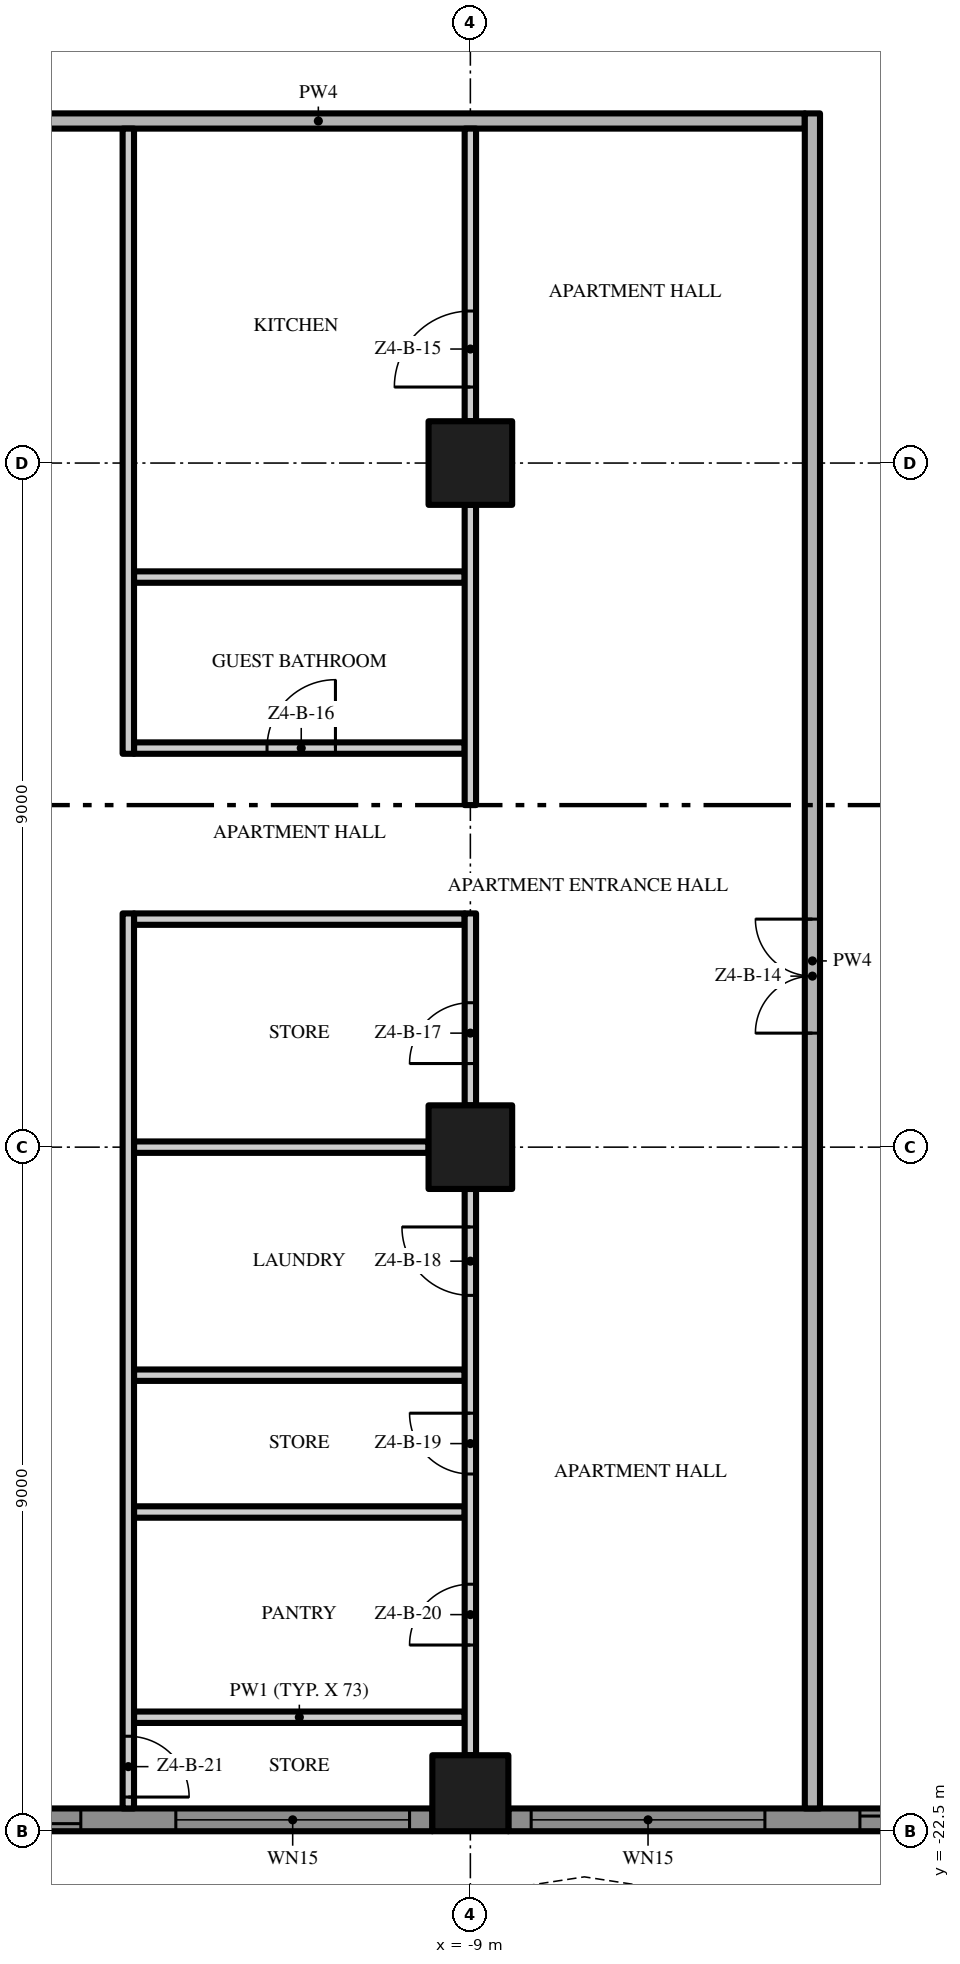
"""IFC4 building model, lengths in metres.
Left out: names, types, materials, properties, quantities, classifications, styles, units other than length and angle.
Written with IfcOpenShell. Run it as: python <this file> out.ifc"""

import sys

from ifc_helpers import new_model, si_unit, direction, frame, frame_2d, origin, origin_2d, place, context, subcontext, project, spatial, polyline, rectangle, outline, extrude, element, fill, save


model = new_model("IFC4")
c1 = context("Model", 3, precision=1e-05, world=origin(), true_north=direction((0.0, 1.0)))
c2 = subcontext(c1, "Body", "Model", "MODEL_VIEW")
j1 = project(units=[si_unit("LENGTHUNIT", "METRE"), si_unit("PLANEANGLEUNIT", "RADIAN")], contexts=[c1])
p1 = place(None, origin())
s1 = spatial("IfcSite", under=j1, at=p1, CompositionType="ELEMENT")
p2 = place(p1, origin())
s2 = spatial("IfcBuilding", under=s1, at=p2, CompositionType="ELEMENT")
p3 = place(p2, frame((0.0, 0.0, 203.4)))
s3 = spatial("IfcBuildingStorey", under=s2, at=p3, CompositionType="ELEMENT", Elevation=203.4)
p4 = place(p3, frame((-9.0, -13.5, 0.0), z_axis=(0.0, 0.0, 1.0), x_axis=(1.0, 0.0, 0.0)))
e1 = element("IfcColumn", 1, at=p4, inside=s3, PredefinedType="COLUMN", context=c2, shape_type="SweptSolid", body=[
    extrude(rectangle(XDim=1.1, YDim=1.1, at=origin_2d()), origin(), (0.0, 0.0, 1.0), 3.5),
])
p5 = place(p3, frame((-9.0, -22.0, 0.0), z_axis=(0.0, 0.0, 1.0), x_axis=(1.0, 0.0, 0.0)))
e2 = element("IfcColumn", 2, at=p5, inside=s3, PredefinedType="COLUMN", context=c2, shape_type="SweptSolid", body=[
    extrude(rectangle(XDim=1.0, YDim=1.0, at=origin_2d()), origin(), (0.0, 0.0, 1.0), 3.5),
])
p6 = place(p3, frame((-9.0, -4.5, 0.0), z_axis=(0.0, 0.0, 1.0), x_axis=(1.0, 0.0, 0.0)))
e3 = element("IfcColumn", 3, at=p6, inside=s3, PredefinedType="COLUMN", context=c2, shape_type="SweptSolid", body=[
    extrude(rectangle(XDim=1.1, YDim=1.1, at=origin_2d()), origin(), (0.0, 0.0, 1.0), 3.5),
])
p7 = place(p3, frame((-9.5, -22.35, 0.0), z_axis=(0.0, 0.0, 1.0), x_axis=(-1.0, 0.0, 0.0)))
e4 = element("IfcWall", 4, at=p7, inside=s3, PredefinedType="SOLIDWALL", context=c2, shape_type="SweptSolid", body=[
    extrude(rectangle(XDim=8.0, YDim=0.3, at=frame_2d((4.0, 0.0))), origin(), (0.0, 0.0, 1.0), 3.5),
])
p8 = place(p7, frame((4.625, 0.0, 0.0)))
e5 = element("IfcOpeningElement", 5, at=p8, cuts=e4, PredefinedType="OPENING", context=c2, shape_type="SweptSolid", body=[
    extrude(rectangle(XDim=3.075, YDim=2.4, at=frame_2d((1.538, 1.2))), frame((0.0, 0.16, 0.0), z_axis=(0.0, -1.0, 0.0), x_axis=(1.0, 0.0, 0.0)), (0.0, 0.0, 1.0), 0.32),
])
p9 = place(p7, frame((0.3, 0.0, 0.45)))
e6 = element("IfcOpeningElement", 6, at=p9, cuts=e4, PredefinedType="OPENING", context=c2, shape_type="SweptSolid", body=[
    extrude(rectangle(XDim=3.075, YDim=2.65, at=frame_2d((1.538, 1.325))), frame((0.0, 0.16, 0.0), z_axis=(0.0, -1.0, 0.0), x_axis=(1.0, 0.0, 0.0)), (0.0, 0.0, 1.0), 0.32),
])
p10 = place(p3, frame((-0.5, -22.35, 0.0), z_axis=(0.0, 0.0, 1.0), x_axis=(-1.0, 0.0, 0.0)))
e7 = element("IfcWall", 7, at=p10, inside=s3, PredefinedType="SOLIDWALL", context=c2, shape_type="SweptSolid", body=[
    extrude(rectangle(XDim=8.0, YDim=0.3, at=frame_2d((4.0, 0.0))), origin(), (0.0, 0.0, 1.0), 3.5),
])
p11 = place(p10, frame((4.625, 0.0, 0.45)))
e8 = element("IfcOpeningElement", 8, at=p11, cuts=e7, PredefinedType="OPENING", context=c2, shape_type="SweptSolid", body=[
    extrude(rectangle(XDim=3.075, YDim=2.65, at=frame_2d((1.538, 1.325))), frame((0.0, 0.16, 0.0), z_axis=(0.0, -1.0, 0.0), x_axis=(1.0, 0.0, 0.0)), (0.0, 0.0, 1.0), 0.32),
])
p12 = place(p10, frame((0.3, 0.0, 0.0)))
e9 = element("IfcOpeningElement", 9, at=p12, cuts=e7, PredefinedType="OPENING", context=c2, shape_type="SweptSolid", body=[
    extrude(rectangle(XDim=3.075, YDim=2.4, at=frame_2d((1.538, 1.2))), frame((0.0, 0.16, 0.0), z_axis=(0.0, -1.0, 0.0), x_axis=(1.0, 0.0, 0.0)), (0.0, 0.0, 1.0), 0.32),
])
p13 = place(p3, origin())
e10 = element("IfcWall", 10, at=p13, inside=s3, PredefinedType="USERDEFINED", context=c2, shape_type="SweptSolid", body=[
    extrude(outline(polyline([(-22.5, -23.1), (-21.0, -23.329), (-19.5, -23.929), (-18.0, -24.671), (-16.5, -25.271), (-15.0, -25.5), (-13.5, -25.271), (-12.0, -24.671), (-10.5, -23.929), (-9.0, -23.329), (-7.5, -23.1), (-6.0, -23.329), (-4.5, -23.929), (-3.0, -24.671), (-1.5, -25.271), (0.0, -25.5), (1.5, -25.271), (3.0, -24.671), (4.5, -23.929), (6.0, -23.329), (7.5, -23.1), (9.0, -23.329), (10.5, -23.929), (12.0, -24.671), (13.5, -25.271), (15.0, -25.5), (16.5, -25.271), (18.0, -24.671), (19.5, -23.929), (21.0, -23.329), (22.5, -23.1), (22.462, -22.853), (20.934, -23.086), (19.398, -23.701), (17.898, -24.442), (16.434, -25.028), (15.0, -25.247), (13.566, -25.028), (12.102, -24.442), (10.602, -23.701), (9.066, -23.086), (7.5, -22.847), (5.934, -23.086), (4.398, -23.701), (2.898, -24.442), (1.434, -25.028), (0.0, -25.247), (-1.434, -25.028), (-2.898, -24.442), (-4.398, -23.701), (-5.934, -23.086), (-7.5, -22.847), (-9.066, -23.086), (-10.602, -23.701), (-12.102, -24.442), (-13.566, -25.028), (-15.0, -25.247), (-16.434, -25.028), (-17.898, -24.442), (-19.398, -23.701), (-20.934, -23.086), (-22.462, -22.853), (-22.5, -23.1)])), origin(), (0.0, 0.0, 1.0), 0.9),
])
for number, where, z_axis, x_axis in (
    (11, (-13.425, -21.0, 0.0), (0.0, 0.0, 1.0), (1.0, 0.0, 0.0)),
    (12, (-13.425, -18.3, 0.0), (0.0, 0.0, 1.0), (1.0, 0.0, 0.0)),
    (13, (-13.425, -16.5, 0.0), (0.0, 0.0, 1.0), (1.0, 0.0, 0.0)),
):
    element("IfcWall", number, at=place(p3, frame(where, z_axis=z_axis, x_axis=x_axis)), inside=s3, PredefinedType="PARTITIONING", context=c2, shape_type="SweptSolid", body=[
        extrude(rectangle(XDim=4.35, YDim=0.15, at=frame_2d((2.175, 0.0))), origin(), (0.0, 0.0, 1.0), 3.5),
    ])
p14 = place(p3, frame((-13.425, -13.5, 0.0), z_axis=(0.0, 0.0, 1.0), x_axis=(1.0, 0.0, 0.0)))
e14 = element("IfcWall", 14, at=p14, inside=s3, PredefinedType="PARTITIONING", context=c2, shape_type="SweptSolid", body=[
    extrude(rectangle(XDim=3.875, YDim=0.15, at=frame_2d((1.938, 0.0))), origin(), (0.0, 0.0, 1.0), 3.5),
])
p15 = place(p3, frame((-13.425, -10.5, 0.0), z_axis=(0.0, 0.0, 1.0), x_axis=(1.0, 0.0, 0.0)))
e15 = element("IfcWall", 15, at=p15, inside=s3, PredefinedType="PARTITIONING", context=c2, shape_type="SweptSolid", body=[
    extrude(rectangle(XDim=4.35, YDim=0.15, at=frame_2d((2.175, 0.0))), origin(), (0.0, 0.0, 1.0), 3.5),
])
p16 = place(p3, frame((-13.425, -8.25, 0.0), z_axis=(0.0, 0.0, 1.0), x_axis=(1.0, 0.0, 0.0)))
e16 = element("IfcWall", 16, at=p16, inside=s3, PredefinedType="PARTITIONING", context=c2, shape_type="SweptSolid", body=[
    extrude(rectangle(XDim=4.35, YDim=0.15, at=frame_2d((2.175, 0.0))), origin(), (0.0, 0.0, 1.0), 3.5),
])
p17 = place(p16, frame((1.75, 0.0, 0.0)))
e17 = element("IfcOpeningElement", 17, at=p17, cuts=e16, PredefinedType="OPENING", context=c2, shape_type="SweptSolid", body=[
    extrude(rectangle(XDim=0.9, YDim=2.1, at=frame_2d((0.45, 1.05))), frame((0.0, 0.085, 0.0), z_axis=(0.0, -1.0, 0.0), x_axis=(1.0, 0.0, 0.0)), (0.0, 0.0, 1.0), 0.17),
])
p18 = place(p3, frame((-13.425, -6.0, 0.0), z_axis=(0.0, 0.0, 1.0), x_axis=(1.0, 0.0, 0.0)))
e18 = element("IfcWall", 18, at=p18, inside=s3, PredefinedType="PARTITIONING", context=c2, shape_type="SweptSolid", body=[
    extrude(rectangle(XDim=4.35, YDim=0.15, at=frame_2d((2.175, 0.0))), origin(), (0.0, 0.0, 1.0), 3.5),
])
p19 = place(p3, frame((-17.4, 0.0, 0.0), z_axis=(0.0, 0.0, 1.0), x_axis=(1.0, 0.0, 0.0)))
e19 = element("IfcWall", 19, at=p19, inside=s3, PredefinedType="PARTITIONING", context=c2, shape_type="SweptSolid", body=[
    extrude(rectangle(XDim=12.8, YDim=0.2, at=frame_2d((6.4, 0.0))), origin(), (0.0, 0.0, 1.0), 3.5),
])
p20 = place(p3, frame((-13.5, -10.425, 0.0), z_axis=(0.0, 0.0, 1.0), x_axis=(0.0, -1.0, 0.0)))
e20 = element("IfcWall", 20, at=p20, inside=s3, PredefinedType="PARTITIONING", context=c2, shape_type="SweptSolid", body=[
    extrude(rectangle(XDim=11.775, YDim=0.15, at=frame_2d((5.888, 0.0))), origin(), (0.0, 0.0, 1.0), 3.5),
])
p21 = place(p20, frame((10.825, 0.0, 0.0)))
e21 = element("IfcOpeningElement", 21, at=p21, cuts=e20, PredefinedType="OPENING", context=c2, shape_type="SweptSolid", body=[
    extrude(rectangle(XDim=0.8, YDim=2.0, at=frame_2d((0.4, 1.0))), frame((0.0, 0.085, 0.0), z_axis=(0.0, -1.0, 0.0), x_axis=(1.0, 0.0, 0.0)), (0.0, 0.0, 1.0), 0.17),
])
p22 = place(p3, frame((-13.5, -8.325, 0.0), z_axis=(0.0, 0.0, 1.0), x_axis=(0.0, 1.0, 0.0)))
e22 = element("IfcWall", 22, at=p22, inside=s3, PredefinedType="PARTITIONING", context=c2, shape_type="SweptSolid", body=[
    extrude(rectangle(XDim=8.225, YDim=0.15, at=frame_2d((4.112, 0.0))), origin(), (0.0, 0.0, 1.0), 3.5),
])
p23 = place(p3, frame((-9.0, -21.5, 0.0), z_axis=(0.0, 0.0, 1.0), x_axis=(0.0, 1.0, 0.0)))
e23 = element("IfcWall", 23, at=p23, inside=s3, PredefinedType="PARTITIONING", context=c2, shape_type="SweptSolid", body=[
    extrude(rectangle(XDim=7.45, YDim=0.15, at=frame_2d((3.725, 0.0))), origin(), (0.0, 0.0, 1.0), 3.5),
])
p24 = place(p23, frame((6.05, 0.0, 0.0)))
e24 = element("IfcOpeningElement", 24, at=p24, cuts=e23, PredefinedType="OPENING", context=c2, shape_type="SweptSolid", body=[
    extrude(rectangle(XDim=0.9, YDim=2.1, at=frame_2d((0.45, 1.05))), frame((0.0, 0.085, 0.0), z_axis=(0.0, -1.0, 0.0), x_axis=(1.0, 0.0, 0.0)), (0.0, 0.0, 1.0), 0.17),
])
p25 = place(p23, frame((3.7, 0.0, 0.0)))
e25 = element("IfcOpeningElement", 25, at=p25, cuts=e23, PredefinedType="OPENING", context=c2, shape_type="SweptSolid", body=[
    extrude(rectangle(XDim=0.8, YDim=2.0, at=frame_2d((0.4, 1.0))), frame((0.0, 0.085, 0.0), z_axis=(0.0, -1.0, 0.0), x_axis=(1.0, 0.0, 0.0)), (0.0, 0.0, 1.0), 0.17),
])
p26 = place(p23, frame((1.45, 0.0, 0.0)))
e26 = element("IfcOpeningElement", 26, at=p26, cuts=e23, PredefinedType="OPENING", context=c2, shape_type="SweptSolid", body=[
    extrude(rectangle(XDim=0.8, YDim=2.0, at=frame_2d((0.4, 1.0))), frame((0.0, 0.085, 0.0), z_axis=(0.0, -1.0, 0.0), x_axis=(1.0, 0.0, 0.0)), (0.0, 0.0, 1.0), 0.17),
])
p27 = place(p3, frame((-9.0, -12.95, 0.0), z_axis=(0.0, 0.0, 1.0), x_axis=(0.0, 1.0, 0.0)))
e27 = element("IfcWall", 27, at=p27, inside=s3, PredefinedType="PARTITIONING", context=c2, shape_type="SweptSolid", body=[
    extrude(rectangle(XDim=2.525, YDim=0.15, at=frame_2d((1.262, 0.0))), origin(), (0.0, 0.0, 1.0), 3.5),
])
p28 = place(p27, frame((0.55, 0.0, 0.0)))
e28 = element("IfcOpeningElement", 28, at=p28, cuts=e27, PredefinedType="OPENING", context=c2, shape_type="SweptSolid", body=[
    extrude(rectangle(XDim=0.8, YDim=2.0, at=frame_2d((0.4, 1.0))), frame((0.0, 0.085, 0.0), z_axis=(0.0, -1.0, 0.0), x_axis=(1.0, 0.0, 0.0)), (0.0, 0.0, 1.0), 0.17),
])
p29 = place(p3, frame((-9.0, -9.0, 0.0), z_axis=(0.0, 0.0, 1.0), x_axis=(0.0, 1.0, 0.0)))
e29 = element("IfcWall", 29, at=p29, inside=s3, PredefinedType="PARTITIONING", context=c2, shape_type="SweptSolid", body=[
    extrude(rectangle(XDim=3.95, YDim=0.15, at=frame_2d((1.975, 0.0))), origin(), (0.0, 0.0, 1.0), 3.5),
])
p30 = place(p3, frame((-9.0, -3.95, 0.0), z_axis=(0.0, 0.0, 1.0), x_axis=(0.0, 1.0, 0.0)))
e30 = element("IfcWall", 30, at=p30, inside=s3, PredefinedType="PARTITIONING", context=c2, shape_type="SweptSolid", body=[
    extrude(rectangle(XDim=3.85, YDim=0.15, at=frame_2d((1.925, 0.0))), origin(), (0.0, 0.0, 1.0), 3.5),
])
p31 = place(p30, frame((0.45, 0.0, 0.0)))
e31 = element("IfcOpeningElement", 31, at=p31, cuts=e30, PredefinedType="OPENING", context=c2, shape_type="SweptSolid", body=[
    extrude(rectangle(XDim=1.0, YDim=2.4, at=frame_2d((0.5, 1.2))), frame((0.0, 0.085, 0.0), z_axis=(0.0, -1.0, 0.0), x_axis=(1.0, 0.0, 0.0)), (0.0, 0.0, 1.0), 0.17),
])
p32 = place(p3, frame((-4.5, -22.2, 0.0), z_axis=(0.0, 0.0, 1.0), x_axis=(0.0, 1.0, 0.0)))
e32 = element("IfcWall", 32, at=p32, inside=s3, PredefinedType="PARTITIONING", context=c2, shape_type="SweptSolid", body=[
    extrude(rectangle(XDim=22.3, YDim=0.2, at=frame_2d((11.15, 0.0))), origin(), (0.0, 0.0, 1.0), 3.5),
])
p33 = place(p32, frame((10.2, 0.0, 0.0)))
e33 = element("IfcOpeningElement", 33, at=p33, cuts=e32, PredefinedType="OPENING", context=c2, shape_type="SweptSolid", body=[
    extrude(rectangle(XDim=1.5, YDim=2.4, at=frame_2d((0.75, 1.2))), frame((0.0, 0.11, 0.0), z_axis=(0.0, -1.0, 0.0), x_axis=(1.0, 0.0, 0.0)), (0.0, 0.0, 1.0), 0.22),
])
p34 = place(p8, origin())
e34 = element("IfcDoor", 34, at=p34, inside=s3, OperationType="SINGLE_SWING_LEFT", PredefinedType="DOOR", context=c2, shape_type="SweptSolid", body=[
    extrude(rectangle(XDim=3.075, YDim=2.4, at=frame_2d((1.538, 1.2))), frame((0.0, 0.025, 0.0), z_axis=(0.0, -1.0, 0.0), x_axis=(1.0, 0.0, 0.0)), (0.0, 0.0, 1.0), 0.05),
])
fill(e5, e34)
p35 = place(p9, origin())
e35 = element("IfcWindow", 35, at=p35, inside=s3, PartitioningType="SINGLE_PANEL", PredefinedType="WINDOW", context=c2, shape_type="SweptSolid", body=[
    extrude(rectangle(XDim=3.075, YDim=2.65, at=frame_2d((1.538, 1.325))), frame((0.0, 0.03, 0.0), z_axis=(0.0, -1.0, 0.0), x_axis=(1.0, 0.0, 0.0)), (0.0, 0.0, 1.0), 0.06),
])
fill(e6, e35)
p36 = place(p11, origin())
e36 = element("IfcWindow", 36, at=p36, inside=s3, PartitioningType="SINGLE_PANEL", PredefinedType="WINDOW", context=c2, shape_type="SweptSolid", body=[
    extrude(rectangle(XDim=3.075, YDim=2.65, at=frame_2d((1.538, 1.325))), frame((0.0, 0.03, 0.0), z_axis=(0.0, -1.0, 0.0), x_axis=(1.0, 0.0, 0.0)), (0.0, 0.0, 1.0), 0.06),
])
fill(e8, e36)
p37 = place(p12, origin())
e37 = element("IfcDoor", 37, at=p37, inside=s3, OperationType="SINGLE_SWING_LEFT", PredefinedType="DOOR", context=c2, shape_type="SweptSolid", body=[
    extrude(rectangle(XDim=3.075, YDim=2.4, at=frame_2d((1.538, 1.2))), frame((0.0, 0.025, 0.0), z_axis=(0.0, -1.0, 0.0), x_axis=(1.0, 0.0, 0.0)), (0.0, 0.0, 1.0), 0.05),
])
fill(e9, e37)
p38 = place(p33, origin())
e38 = element("IfcDoor", 38, at=p38, inside=s3, OperationType="DOUBLE_DOOR_SINGLE_SWING", PredefinedType="DOOR", context=c2, shape_type="SweptSolid", body=[
    extrude(rectangle(XDim=1.5, YDim=2.4, at=frame_2d((0.75, 1.2))), frame((0.0, 0.025, 0.0), z_axis=(0.0, -1.0, 0.0), x_axis=(1.0, 0.0, 0.0)), (0.0, 0.0, 1.0), 0.05),
])
fill(e33, e38)
p39 = place(p31, origin())
e39 = element("IfcDoor", 39, at=p39, inside=s3, OperationType="SINGLE_SWING_LEFT", PredefinedType="DOOR", context=c2, shape_type="SweptSolid", body=[
    extrude(rectangle(XDim=1.0, YDim=2.4, at=frame_2d((0.5, 1.2))), frame((0.0, 0.025, 0.0), z_axis=(0.0, -1.0, 0.0), x_axis=(1.0, 0.0, 0.0)), (0.0, 0.0, 1.0), 0.05),
])
fill(e31, e39)
p40 = place(p17, origin())
e40 = element("IfcDoor", 40, at=p40, inside=s3, OperationType="SINGLE_SWING_RIGHT", PredefinedType="DOOR", context=c2, shape_type="SweptSolid", body=[
    extrude(rectangle(XDim=0.9, YDim=2.1, at=frame_2d((0.45, 1.05))), frame((0.0, 0.025, 0.0), z_axis=(0.0, -1.0, 0.0), x_axis=(1.0, 0.0, 0.0)), (0.0, 0.0, 1.0), 0.05),
])
fill(e17, e40)
p41 = place(p28, origin())
e41 = element("IfcDoor", 41, at=p41, inside=s3, OperationType="SINGLE_SWING_LEFT", PredefinedType="DOOR", context=c2, shape_type="SweptSolid", body=[
    extrude(rectangle(XDim=0.8, YDim=2.0, at=frame_2d((0.4, 1.0))), frame((0.0, 0.025, 0.0), z_axis=(0.0, -1.0, 0.0), x_axis=(1.0, 0.0, 0.0)), (0.0, 0.0, 1.0), 0.05),
])
fill(e28, e41)
p42 = place(p24, origin())
e42 = element("IfcDoor", 42, at=p42, inside=s3, OperationType="SINGLE_SWING_RIGHT", PredefinedType="DOOR", context=c2, shape_type="SweptSolid", body=[
    extrude(rectangle(XDim=0.9, YDim=2.1, at=frame_2d((0.45, 1.05))), frame((0.0, 0.025, 0.0), z_axis=(0.0, -1.0, 0.0), x_axis=(1.0, 0.0, 0.0)), (0.0, 0.0, 1.0), 0.05),
])
fill(e24, e42)
p43 = place(p25, origin())
e43 = element("IfcDoor", 43, at=p43, inside=s3, OperationType="SINGLE_SWING_RIGHT", PredefinedType="DOOR", context=c2, shape_type="SweptSolid", body=[
    extrude(rectangle(XDim=0.8, YDim=2.0, at=frame_2d((0.4, 1.0))), frame((0.0, 0.025, 0.0), z_axis=(0.0, -1.0, 0.0), x_axis=(1.0, 0.0, 0.0)), (0.0, 0.0, 1.0), 0.05),
])
fill(e25, e43)
p44 = place(p26, origin())
e44 = element("IfcDoor", 44, at=p44, inside=s3, OperationType="SINGLE_SWING_LEFT", PredefinedType="DOOR", context=c2, shape_type="SweptSolid", body=[
    extrude(rectangle(XDim=0.8, YDim=2.0, at=frame_2d((0.4, 1.0))), frame((0.0, 0.025, 0.0), z_axis=(0.0, -1.0, 0.0), x_axis=(1.0, 0.0, 0.0)), (0.0, 0.0, 1.0), 0.05),
])
fill(e26, e44)
p45 = place(p21, origin())
e45 = element("IfcDoor", 45, at=p45, inside=s3, OperationType="SINGLE_SWING_RIGHT", PredefinedType="DOOR", context=c2, shape_type="SweptSolid", body=[
    extrude(rectangle(XDim=0.8, YDim=2.0, at=frame_2d((0.4, 1.0))), frame((0.0, 0.025, 0.0), z_axis=(0.0, -1.0, 0.0), x_axis=(1.0, 0.0, 0.0)), (0.0, 0.0, 1.0), 0.05),
])
fill(e21, e45)
save(model, sys.argv[1])
